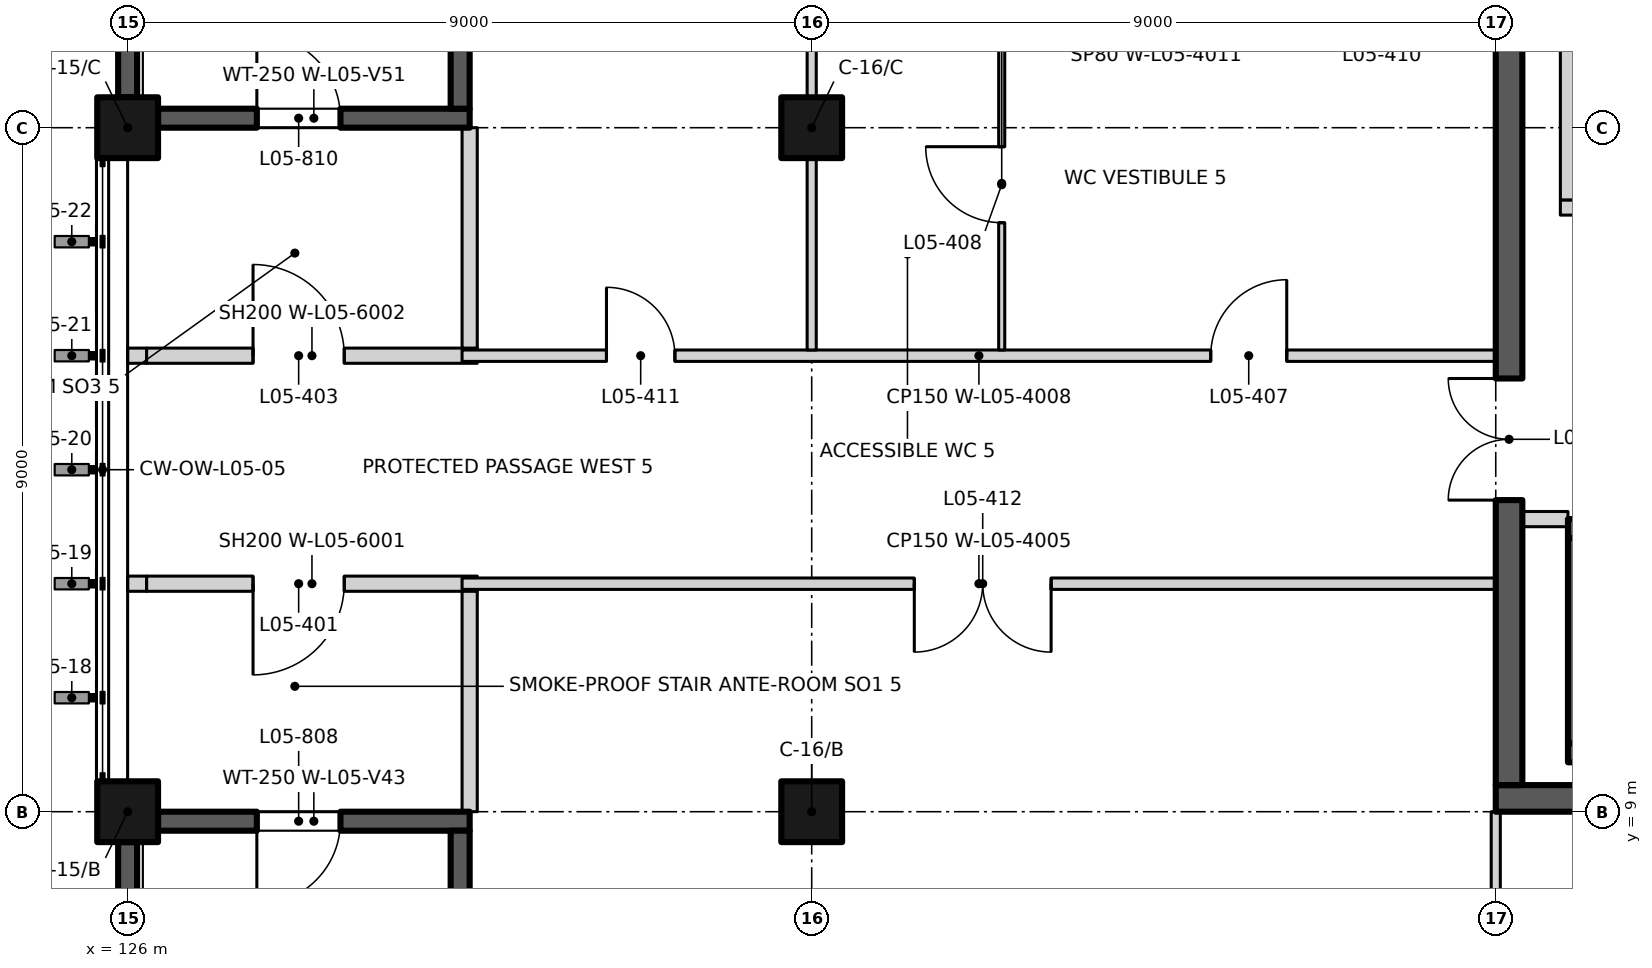
"""IFC4 building model, lengths in metres.
Left out: names, types, materials, properties, quantities, classifications, styles, units other than length and angle.
Written with IfcOpenShell. Run it as: python <this file> out.ifc"""

import sys

from ifc_helpers import new_model, si_unit, direction, frame, frame_2d, origin, origin_2d, place, context, subcontext, project, spatial, rectangle, extrude, element, fill, save


model = new_model("IFC4")
c1 = context("Model", 3, precision=1e-05, world=origin(), true_north=direction((0.0, 1.0)))
c2 = subcontext(c1, "Body", "Model", "MODEL_VIEW")
j1 = project(units=[si_unit("LENGTHUNIT", "METRE"), si_unit("PLANEANGLEUNIT", "RADIAN")], contexts=[c1])
p1 = place(None, origin())
s1 = spatial("IfcSite", under=j1, at=p1, CompositionType="ELEMENT")
p2 = place(p1, origin())
s2 = spatial("IfcBuilding", under=s1, at=p2, CompositionType="ELEMENT")
p3 = place(p2, frame((0.0, 0.0, 24.0)))
s3 = spatial("IfcBuildingStorey", under=s2, at=p3, CompositionType="ELEMENT", Elevation=24.0)
for number, where, z_axis, x_axis in (
    (1, (126.0, 9.0, 0.0), (0.0, 0.0, 1.0), (1.0, 0.0, 0.0)),
    (2, (135.0, 9.0, 0.0), (0.0, 0.0, 1.0), (1.0, 0.0, 0.0)),
    (3, (126.0, 18.0, 0.0), (0.0, 0.0, 1.0), (1.0, 0.0, 0.0)),
    (4, (135.0, 18.0, 0.0), (0.0, 0.0, 1.0), (1.0, 0.0, 0.0)),
):
    element("IfcColumn", number, at=place(p3, frame(where, z_axis=z_axis, x_axis=x_axis)), inside=s3, PredefinedType="COLUMN", context=c2, shape_type="SweptSolid", body=[
        extrude(rectangle(XDim=0.8, YDim=0.8, at=origin_2d()), origin(), (0.0, 0.0, 1.0), 4.5),
    ])
p4 = place(p3, frame((126.4, 8.875, 0.0), z_axis=(0.0, 0.0, 1.0), x_axis=(1.0, 0.0, 0.0)))
e5 = element("IfcWall", 5, at=p4, inside=s3, PredefinedType="SHEAR", context=c2, shape_type="SweptSolid", body=[
    extrude(rectangle(XDim=4.1, YDim=0.25, at=frame_2d((2.05, 0.0))), origin(), (0.0, 0.0, 1.0), 4.5),
])
p5 = place(p4, frame((2.4, 0.0, 0.0), z_axis=(0.0, 0.0, 1.0), x_axis=(-1.0, 0.0, 0.0)))
e6 = element("IfcOpeningElement", 6, at=p5, cuts=e5, PredefinedType="OPENING", context=c2, shape_type="SweptSolid", body=[
    extrude(rectangle(XDim=1.1, YDim=2.1, at=frame_2d((0.55, 1.05))), frame((0.0, 0.135, 0.0), z_axis=(0.0, -1.0, 0.0), x_axis=(1.0, 0.0, 0.0)), (0.0, 0.0, 1.0), 0.27),
])
p6 = place(p3, frame((126.0, 0.4, 0.0), z_axis=(0.0, 0.0, 1.0), x_axis=(0.0, 1.0, 0.0)))
e7 = element("IfcWall", 7, at=p6, inside=s3, PredefinedType="SHEAR", context=c2, shape_type="SweptSolid", body=[
    extrude(rectangle(XDim=8.2, YDim=0.25, at=frame_2d((4.1, 0.0))), origin(), (0.0, 0.0, 1.0), 4.5),
])
p7 = place(p3, frame((130.375, 0.125, 0.0), z_axis=(0.0, 0.0, 1.0), x_axis=(0.0, 1.0, 0.0)))
e8 = element("IfcWall", 8, at=p7, inside=s3, PredefinedType="SHEAR", context=c2, shape_type="SweptSolid", body=[
    extrude(rectangle(XDim=8.625, YDim=0.25, at=frame_2d((4.312, 0.0))), origin(), (0.0, 0.0, 1.0), 4.5),
])
p8 = place(p3, frame((126.4, 18.125, 0.0), z_axis=(0.0, 0.0, 1.0), x_axis=(1.0, 0.0, 0.0)))
e9 = element("IfcWall", 9, at=p8, inside=s3, PredefinedType="SHEAR", context=c2, shape_type="SweptSolid", body=[
    extrude(rectangle(XDim=4.1, YDim=0.25, at=frame_2d((2.05, 0.0))), origin(), (0.0, 0.0, 1.0), 4.5),
])
p9 = place(p8, frame((1.3, 0.0, 0.0)))
e10 = element("IfcOpeningElement", 10, at=p9, cuts=e9, PredefinedType="OPENING", context=c2, shape_type="SweptSolid", body=[
    extrude(rectangle(XDim=1.1, YDim=2.1, at=frame_2d((0.55, 1.05))), frame((0.0, 0.135, 0.0), z_axis=(0.0, -1.0, 0.0), x_axis=(1.0, 0.0, 0.0)), (0.0, 0.0, 1.0), 0.27),
])
p10 = place(p3, frame((126.0, 18.4, 0.0), z_axis=(0.0, 0.0, 1.0), x_axis=(0.0, 1.0, 0.0)))
e11 = element("IfcWall", 11, at=p10, inside=s3, PredefinedType="SHEAR", context=c2, shape_type="SweptSolid", body=[
    extrude(rectangle(XDim=8.2, YDim=0.25, at=frame_2d((4.1, 0.0))), origin(), (0.0, 0.0, 1.0), 4.5),
])
p11 = place(p3, frame((130.375, 18.25, 0.0), z_axis=(0.0, 0.0, 1.0), x_axis=(0.0, 1.0, 0.0)))
e12 = element("IfcWall", 12, at=p11, inside=s3, PredefinedType="SHEAR", context=c2, shape_type="SweptSolid", body=[
    extrude(rectangle(XDim=8.625, YDim=0.25, at=frame_2d((4.312, 0.0))), origin(), (0.0, 0.0, 1.0), 4.5),
])
p12 = place(p3, frame((144.95, 12.725, 0.0), z_axis=(0.0, 0.0, 1.0), x_axis=(1.0, 0.0, 0.0)))
e13 = element("IfcWall", 13, at=p12, inside=s3, PredefinedType="SHEAR", context=c2, shape_type="SweptSolid", body=[
    extrude(rectangle(XDim=12.05, YDim=0.25, at=frame_2d((6.025, 0.0))), origin(), (0.0, 0.0, 1.0), 4.5),
])
p13 = place(p12, frame((1.05, 0.0, 0.0)))
e14 = element("IfcOpeningElement", 14, at=p13, cuts=e13, PredefinedType="OPENING", context=c2, shape_type="SweptSolid", body=[
    extrude(rectangle(XDim=1.1, YDim=2.1, at=frame_2d((0.55, 1.05))), frame((0.0, 0.135, 0.0), z_axis=(0.0, -1.0, 0.0), x_axis=(1.0, 0.0, 0.0)), (0.0, 0.0, 1.0), 0.27),
])
p14 = place(p12, frame((4.0, 0.0, 0.0)))
e15 = element("IfcOpeningElement", 15, at=p14, cuts=e13, PredefinedType="OPENING", context=c2, shape_type="SweptSolid", body=[
    extrude(rectangle(XDim=1.1, YDim=2.1, at=frame_2d((0.55, 1.05))), frame((0.0, 0.135, 0.0), z_axis=(0.0, -1.0, 0.0), x_axis=(1.0, 0.0, 0.0)), (0.0, 0.0, 1.0), 0.27),
])
p15 = place(p12, frame((6.95, 0.0, 0.0)))
e16 = element("IfcOpeningElement", 16, at=p15, cuts=e13, PredefinedType="OPENING", context=c2, shape_type="SweptSolid", body=[
    extrude(rectangle(XDim=1.1, YDim=2.1, at=frame_2d((0.55, 1.05))), frame((0.0, 0.135, 0.0), z_axis=(0.0, -1.0, 0.0), x_axis=(1.0, 0.0, 0.0)), (0.0, 0.0, 1.0), 0.27),
])
p16 = place(p12, frame((9.9, 0.0, 0.0)))
e17 = element("IfcOpeningElement", 17, at=p16, cuts=e13, PredefinedType="OPENING", context=c2, shape_type="SweptSolid", body=[
    extrude(rectangle(XDim=1.1, YDim=2.1, at=frame_2d((0.55, 1.05))), frame((0.0, 0.135, 0.0), z_axis=(0.0, -1.0, 0.0), x_axis=(1.0, 0.0, 0.0)), (0.0, 0.0, 1.0), 0.27),
])
p17 = place(p3, frame((144.95, 9.775, 0.0), z_axis=(0.0, 0.0, 1.0), x_axis=(1.0, 0.0, 0.0)))
e18 = element("IfcWall", 18, at=p17, inside=s3, PredefinedType="SHEAR", context=c2, shape_type="SweptSolid", body=[
    extrude(rectangle(XDim=12.05, YDim=0.25, at=frame_2d((6.025, 0.0))), origin(), (0.0, 0.0, 1.0), 4.5),
])
p18 = place(p3, frame((145.075, 9.9, 0.0), z_axis=(0.0, 0.0, 1.0), x_axis=(0.0, 1.0, 0.0)))
e19 = element("IfcWall", 19, at=p18, inside=s3, PredefinedType="SHEAR", context=c2, shape_type="SweptSolid", body=[
    extrude(rectangle(XDim=2.7, YDim=0.25, at=frame_2d((1.35, 0.0))), origin(), (0.0, 0.0, 1.0), 4.5),
])
p19 = place(p3, frame((144.0, 9.175, 0.0), z_axis=(0.0, 0.0, 1.0), x_axis=(1.0, 0.0, 0.0)))
e20 = element("IfcWall", 20, at=p19, inside=s3, PredefinedType="SHEAR", context=c2, shape_type="SweptSolid", body=[
    extrude(rectangle(XDim=18.0, YDim=0.35, at=frame_2d((9.0, 0.0))), origin(), (0.0, 0.0, 1.0), 4.2),
])
p20 = place(p19, frame((16.463, 0.0, 0.0), z_axis=(0.0, 0.0, 1.0), x_axis=(-1.0, 0.0, 0.0)))
e21 = element("IfcOpeningElement", 21, at=p20, cuts=e20, PredefinedType="OPENING", context=c2, shape_type="SweptSolid", body=[
    extrude(rectangle(XDim=2.1, YDim=2.4, at=frame_2d((1.05, 1.2))), frame((0.0, 0.185, 0.0), z_axis=(0.0, -1.0, 0.0), x_axis=(1.0, 0.0, 0.0)), (0.0, 0.0, 1.0), 0.37),
])
p21 = place(p3, frame((126.0, 12.0, 0.0), z_axis=(0.0, 0.0, 1.0), x_axis=(1.0, 0.0, 0.0)))
e22 = element("IfcWall", 22, at=p21, inside=s3, PredefinedType="PARTITIONING", context=c2, shape_type="SweptSolid", body=[
    extrude(rectangle(XDim=0.25, YDim=0.2, at=frame_2d((0.125, 0.0))), origin(), (0.0, 0.0, 1.0), 3.6),
])
p22 = place(p3, frame((126.25, 12.0, 0.0), z_axis=(0.0, 0.0, 1.0), x_axis=(1.0, 0.0, 0.0)))
e23 = element("IfcWall", 23, at=p22, inside=s3, PredefinedType="PARTITIONING", context=c2, shape_type="SweptSolid", body=[
    extrude(rectangle(XDim=4.35, YDim=0.2, at=frame_2d((2.175, 0.0))), origin(), (0.0, 0.0, 1.0), 4.2),
])
p23 = place(p22, frame((2.6, 0.0, 0.0), z_axis=(0.0, 0.0, 1.0), x_axis=(-1.0, 0.0, 0.0)))
e24 = element("IfcOpeningElement", 24, at=p23, cuts=e23, PredefinedType="OPENING", context=c2, shape_type="SweptSolid", body=[
    extrude(rectangle(XDim=1.2, YDim=2.1, at=frame_2d((0.6, 1.05))), frame((0.0, 0.11, 0.0), z_axis=(0.0, -1.0, 0.0), x_axis=(1.0, 0.0, 0.0)), (0.0, 0.0, 1.0), 0.22),
])
p24 = place(p3, frame((130.4, 12.0, 0.0), z_axis=(0.0, 0.0, 1.0), x_axis=(1.0, 0.0, 0.0)))
e25 = element("IfcWall", 25, at=p24, inside=s3, PredefinedType="PARTITIONING", context=c2, shape_type="SweptSolid", body=[
    extrude(rectangle(XDim=13.6, YDim=0.15, at=frame_2d((6.8, 0.0))), origin(), (0.0, 0.0, 1.0), 4.2),
])
p25 = place(p24, frame((7.75, 0.0, 0.0), z_axis=(0.0, 0.0, 1.0), x_axis=(-1.0, 0.0, 0.0)))
e26 = element("IfcOpeningElement", 26, at=p25, cuts=e25, PredefinedType="OPENING", context=c2, shape_type="SweptSolid", body=[
    extrude(rectangle(XDim=1.8, YDim=2.1, at=frame_2d((0.9, 1.05))), frame((0.0, 0.085, 0.0), z_axis=(0.0, -1.0, 0.0), x_axis=(1.0, 0.0, 0.0)), (0.0, 0.0, 1.0), 0.17),
])
p26 = place(p3, frame((144.35, 12.85, 0.0), z_axis=(0.0, 0.0, 1.0), x_axis=(1.0, 0.0, 0.0)))
e27 = element("IfcWall", 27, at=p26, inside=s3, PredefinedType="PARTITIONING", context=c2, shape_type="SweptSolid", body=[
    extrude(rectangle(XDim=0.6, YDim=0.2, at=frame_2d((0.3, 0.0))), origin(), (0.0, 0.0, 1.0), 4.2),
])
p27 = place(p3, frame((126.0, 15.0, 0.0), z_axis=(0.0, 0.0, 1.0), x_axis=(1.0, 0.0, 0.0)))
e28 = element("IfcWall", 28, at=p27, inside=s3, PredefinedType="PARTITIONING", context=c2, shape_type="SweptSolid", body=[
    extrude(rectangle(XDim=0.25, YDim=0.2, at=frame_2d((0.125, 0.0))), origin(), (0.0, 0.0, 1.0), 3.6),
])
p28 = place(p3, frame((126.25, 15.0, 0.0), z_axis=(0.0, 0.0, 1.0), x_axis=(1.0, 0.0, 0.0)))
e29 = element("IfcWall", 29, at=p28, inside=s3, PredefinedType="PARTITIONING", context=c2, shape_type="SweptSolid", body=[
    extrude(rectangle(XDim=4.35, YDim=0.2, at=frame_2d((2.175, 0.0))), origin(), (0.0, 0.0, 1.0), 4.2),
])
p29 = place(p28, frame((1.4, 0.0, 0.0)))
e30 = element("IfcOpeningElement", 30, at=p29, cuts=e29, PredefinedType="OPENING", context=c2, shape_type="SweptSolid", body=[
    extrude(rectangle(XDim=1.2, YDim=2.1, at=frame_2d((0.6, 1.05))), frame((0.0, 0.11, 0.0), z_axis=(0.0, -1.0, 0.0), x_axis=(1.0, 0.0, 0.0)), (0.0, 0.0, 1.0), 0.22),
])
p30 = place(p3, frame((130.4, 15.0, 0.0), z_axis=(0.0, 0.0, 1.0), x_axis=(1.0, 0.0, 0.0)))
e31 = element("IfcWall", 31, at=p30, inside=s3, PredefinedType="PARTITIONING", context=c2, shape_type="SweptSolid", body=[
    extrude(rectangle(XDim=13.6, YDim=0.15, at=frame_2d((6.8, 0.0))), origin(), (0.0, 0.0, 1.0), 4.2),
])
p31 = place(p30, frame((9.85, 0.0, 0.0)))
e32 = element("IfcOpeningElement", 32, at=p31, cuts=e31, PredefinedType="OPENING", context=c2, shape_type="SweptSolid", body=[
    extrude(rectangle(XDim=1.0, YDim=2.1, at=frame_2d((0.5, 1.05))), frame((0.0, 0.085, 0.0), z_axis=(0.0, -1.0, 0.0), x_axis=(1.0, 0.0, 0.0)), (0.0, 0.0, 1.0), 0.17),
])
p32 = place(p30, frame((1.9, 0.0, 0.0)))
e33 = element("IfcOpeningElement", 33, at=p32, cuts=e31, PredefinedType="OPENING", context=c2, shape_type="SweptSolid", body=[
    extrude(rectangle(XDim=0.9, YDim=2.1, at=frame_2d((0.45, 1.05))), frame((0.0, 0.085, 0.0), z_axis=(0.0, -1.0, 0.0), x_axis=(1.0, 0.0, 0.0)), (0.0, 0.0, 1.0), 0.17),
])
p33 = place(p3, frame((144.85, 16.95, 0.0), z_axis=(0.0, 0.0, 1.0), x_axis=(1.0, 0.0, 0.0)))
e34 = element("IfcWall", 34, at=p33, inside=s3, PredefinedType="PARTITIONING", context=c2, shape_type="SweptSolid", body=[
    extrude(rectangle(XDim=6.35, YDim=0.2, at=frame_2d((3.175, 0.0))), origin(), (0.0, 0.0, 1.0), 4.2),
])
p34 = place(p33, frame((2.575, 0.0, 0.0)))
e35 = element("IfcOpeningElement", 35, at=p34, cuts=e34, PredefinedType="OPENING", context=c2, shape_type="SweptSolid", body=[
    extrude(rectangle(XDim=1.2, YDim=2.1, at=frame_2d((0.6, 1.05))), frame((0.0, 0.11, 0.0), z_axis=(0.0, -1.0, 0.0), x_axis=(1.0, 0.0, 0.0)), (0.0, 0.0, 1.0), 0.22),
])
for number, where, z_axis, x_axis in (
    (36, (130.5, 9.0, 0.0), (0.0, 0.0, 1.0), (0.0, 1.0, 0.0)),
    (37, (130.5, 15.1, 0.0), (0.0, 0.0, 1.0), (0.0, 1.0, 0.0)),
):
    element("IfcWall", number, at=place(p3, frame(where, z_axis=z_axis, x_axis=x_axis)), inside=s3, PredefinedType="PARTITIONING", context=c2, shape_type="SweptSolid", body=[
        extrude(rectangle(XDim=2.9, YDim=0.2, at=frame_2d((1.45, 0.0))), origin(), (0.0, 0.0, 1.0), 4.2),
    ])
p35 = place(p3, frame((135.0, 15.075, 0.0), z_axis=(0.0, 0.0, 1.0), x_axis=(0.0, 1.0, 0.0)))
e38 = element("IfcWall", 38, at=p35, inside=s3, PredefinedType="PARTITIONING", context=c2, shape_type="SweptSolid", body=[
    extrude(rectangle(XDim=2.525, YDim=0.12, at=frame_2d((1.263, 0.0))), origin(), (0.0, 0.0, 1.0), 4.2),
])
p36 = place(p3, frame((135.0, 18.4, 0.0), z_axis=(0.0, 0.0, 1.0), x_axis=(0.0, 1.0, 0.0)))
e39 = element("IfcWall", 39, at=p36, inside=s3, PredefinedType="PARTITIONING", context=c2, shape_type="SweptSolid", body=[
    extrude(rectangle(XDim=8.2, YDim=0.12, at=frame_2d((4.1, 0.0))), origin(), (0.0, 0.0, 1.0), 4.2),
])
p37 = place(p3, frame((137.5, 15.075, 0.0), z_axis=(0.0, 0.0, 1.0), x_axis=(0.0, 1.0, 0.0)))
e40 = element("IfcWall", 40, at=p37, inside=s3, PredefinedType="PARTITIONING", context=c2, shape_type="SweptSolid", body=[
    extrude(rectangle(XDim=4.385, YDim=0.08, at=frame_2d((2.192, 0.0))), origin(), (0.0, 0.0, 1.0), 4.2),
])
p38 = place(p37, frame((1.675, 0.0, 0.0)))
e41 = element("IfcOpeningElement", 41, at=p38, cuts=e40, PredefinedType="OPENING", context=c2, shape_type="SweptSolid", body=[
    extrude(rectangle(XDim=1.0, YDim=2.1, at=frame_2d((0.5, 1.05))), frame((0.0, 0.05, 0.0), z_axis=(0.0, -1.0, 0.0), x_axis=(1.0, 0.0, 0.0)), (0.0, 0.0, 1.0), 0.1),
])
p39 = place(p3, frame((144.0, 0.4, 0.0), z_axis=(0.0, 0.0, 1.0), x_axis=(0.0, 1.0, 0.0)))
e42 = element("IfcWall", 42, at=p39, inside=s3, PredefinedType="PARTITIONING", context=c2, shape_type="SweptSolid", body=[
    extrude(rectangle(XDim=8.6, YDim=0.12, at=frame_2d((4.3, 0.0))), origin(), (0.0, 0.0, 1.0), 4.2),
])
p40 = place(p3, frame((144.175, 9.35, 0.0), z_axis=(0.0, 0.0, 1.0), x_axis=(0.0, 1.0, 0.0)))
e43 = element("IfcWall", 43, at=p40, inside=s3, PredefinedType="SHEAR", context=c2, shape_type="SweptSolid", body=[
    extrude(rectangle(XDim=17.4, YDim=0.35, at=frame_2d((8.7, 0.0))), origin(), (0.0, 0.0, 1.0), 4.2),
])
p41 = place(p40, frame((3.75, 0.0, 0.0)))
e44 = element("IfcOpeningElement", 44, at=p41, cuts=e43, PredefinedType="OPENING", context=c2, shape_type="SweptSolid", body=[
    extrude(rectangle(XDim=1.6, YDim=2.4, at=frame_2d((0.8, 1.2))), frame((0.0, 0.185, 0.0), z_axis=(0.0, -1.0, 0.0), x_axis=(1.0, 0.0, 0.0)), (0.0, 0.0, 1.0), 0.37),
])
p42 = place(p3, frame((144.95, 17.05, 0.0), z_axis=(0.0, 0.0, 1.0), x_axis=(0.0, 1.0, 0.0)))
e45 = element("IfcWall", 45, at=p42, inside=s3, PredefinedType="PARTITIONING", context=c2, shape_type="SweptSolid", body=[
    extrude(rectangle(XDim=2.8, YDim=0.2, at=frame_2d((1.4, 0.0))), origin(), (0.0, 0.0, 1.0), 4.2),
])
p43 = place(p5, origin())
e46 = element("IfcDoor", 46, at=p43, inside=s3, OperationType="SINGLE_SWING_RIGHT", PredefinedType="DOOR", context=c2, shape_type="SweptSolid", body=[
    extrude(rectangle(XDim=1.1, YDim=2.1, at=frame_2d((0.55, 1.05))), frame((0.0, 0.025, 0.0), z_axis=(0.0, -1.0, 0.0), x_axis=(1.0, 0.0, 0.0)), (0.0, 0.0, 1.0), 0.05),
])
fill(e6, e46)
p44 = place(p9, origin())
e47 = element("IfcDoor", 47, at=p44, inside=s3, OperationType="SINGLE_SWING_LEFT", PredefinedType="DOOR", context=c2, shape_type="SweptSolid", body=[
    extrude(rectangle(XDim=1.1, YDim=2.1, at=frame_2d((0.55, 1.05))), frame((0.0, 0.025, 0.0), z_axis=(0.0, -1.0, 0.0), x_axis=(1.0, 0.0, 0.0)), (0.0, 0.0, 1.0), 0.05),
])
fill(e10, e47)
p45 = place(p23, origin())
e48 = element("IfcDoor", 48, at=p45, inside=s3, OperationType="SINGLE_SWING_RIGHT", PredefinedType="DOOR", context=c2, shape_type="SweptSolid", body=[
    extrude(rectangle(XDim=1.2, YDim=2.1, at=frame_2d((0.6, 1.05))), frame((0.0, 0.025, 0.0), z_axis=(0.0, -1.0, 0.0), x_axis=(1.0, 0.0, 0.0)), (0.0, 0.0, 1.0), 0.05),
])
fill(e24, e48)
p46 = place(p29, origin())
e49 = element("IfcDoor", 49, at=p46, inside=s3, OperationType="SINGLE_SWING_LEFT", PredefinedType="DOOR", context=c2, shape_type="SweptSolid", body=[
    extrude(rectangle(XDim=1.2, YDim=2.1, at=frame_2d((0.6, 1.05))), frame((0.0, 0.025, 0.0), z_axis=(0.0, -1.0, 0.0), x_axis=(1.0, 0.0, 0.0)), (0.0, 0.0, 1.0), 0.05),
])
fill(e30, e49)
p47 = place(p41, origin())
e50 = element("IfcDoor", 50, at=p47, inside=s3, OperationType="DOUBLE_DOOR_SINGLE_SWING", PredefinedType="DOOR", context=c2, shape_type="SweptSolid", body=[
    extrude(rectangle(XDim=1.6, YDim=2.4, at=frame_2d((0.8, 1.2))), frame((0.0, 0.025, 0.0), z_axis=(0.0, -1.0, 0.0), x_axis=(1.0, 0.0, 0.0)), (0.0, 0.0, 1.0), 0.05),
])
fill(e44, e50)
p48 = place(p31, origin())
e51 = element("IfcDoor", 51, at=p48, inside=s3, OperationType="SINGLE_SWING_RIGHT", PredefinedType="DOOR", context=c2, shape_type="SweptSolid", body=[
    extrude(rectangle(XDim=1.0, YDim=2.1, at=frame_2d((0.5, 1.05))), frame((0.0, 0.025, 0.0), z_axis=(0.0, -1.0, 0.0), x_axis=(1.0, 0.0, 0.0)), (0.0, 0.0, 1.0), 0.05),
])
fill(e32, e51)
p49 = place(p38, origin())
e52 = element("IfcDoor", 52, at=p49, inside=s3, OperationType="SINGLE_SWING_RIGHT", PredefinedType="DOOR", context=c2, shape_type="SweptSolid", body=[
    extrude(rectangle(XDim=1.0, YDim=2.1, at=frame_2d((0.5, 1.05))), frame((0.0, 0.025, 0.0), z_axis=(0.0, -1.0, 0.0), x_axis=(1.0, 0.0, 0.0)), (0.0, 0.0, 1.0), 0.05),
])
fill(e41, e52)
p50 = place(p32, origin())
e53 = element("IfcDoor", 53, at=p50, inside=s3, OperationType="SINGLE_SWING_LEFT", PredefinedType="DOOR", context=c2, shape_type="SweptSolid", body=[
    extrude(rectangle(XDim=0.9, YDim=2.1, at=frame_2d((0.45, 1.05))), frame((0.0, 0.025, 0.0), z_axis=(0.0, -1.0, 0.0), x_axis=(1.0, 0.0, 0.0)), (0.0, 0.0, 1.0), 0.05),
])
fill(e33, e53)
p51 = place(p25, origin())
e54 = element("IfcDoor", 54, at=p51, inside=s3, OperationType="DOUBLE_DOOR_SINGLE_SWING", PredefinedType="DOOR", context=c2, shape_type="SweptSolid", body=[
    extrude(rectangle(XDim=1.8, YDim=2.1, at=frame_2d((0.9, 1.05))), frame((0.0, 0.025, 0.0), z_axis=(0.0, -1.0, 0.0), x_axis=(1.0, 0.0, 0.0)), (0.0, 0.0, 1.0), 0.05),
])
fill(e26, e54)
save(model, sys.argv[1])
